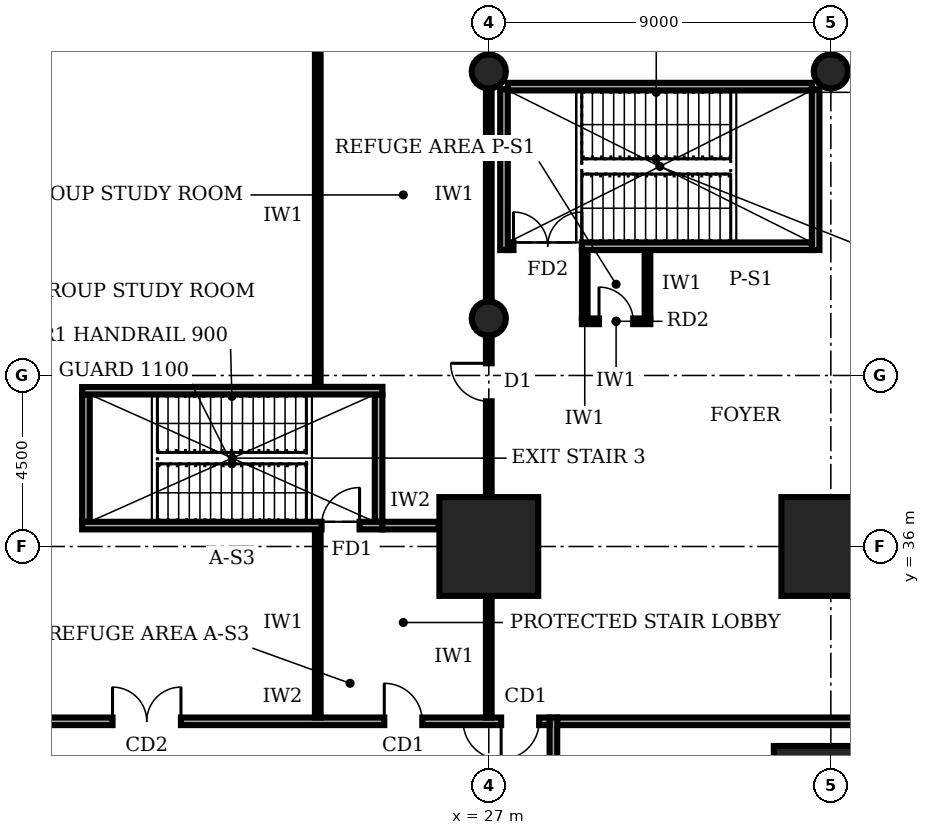
"""IFC4 building model, lengths in metres.
Left out: names, types, materials, properties, quantities, classifications, styles, units other than length and angle.
Written with IfcOpenShell. Run it as: python <this file> out.ifc"""

import sys

from ifc_helpers import new_model, si_unit, direction, frame, frame_2d, origin, origin_2d, place, context, subcontext, project, spatial, rectangle, circle, extrude, element, fill, save


model = new_model("IFC4")
c1 = context("Model", 3, precision=1e-05, world=origin(), true_north=direction((0.0, 1.0)))
c2 = subcontext(c1, "Body", "Model", "MODEL_VIEW")
j1 = project(units=[si_unit("LENGTHUNIT", "METRE"), si_unit("PLANEANGLEUNIT", "RADIAN")], contexts=[c1])
p1 = place(None, origin())
s1 = spatial("IfcSite", under=j1, at=p1, CompositionType="ELEMENT")
p2 = place(p1, origin())
s2 = spatial("IfcBuilding", under=s1, at=p2, CompositionType="ELEMENT")
p3 = place(p2, frame((0.0, 0.0, 11.0)))
s3 = spatial("IfcBuildingStorey", under=s2, at=p3, CompositionType="ELEMENT", Elevation=11.0)
p4 = place(p3, frame((36.0, 29.25, 0.0), z_axis=(0.0, 0.0, 1.0), x_axis=(1.0, 0.0, 0.0)))
e1 = element("IfcColumn", 1, at=p4, inside=s3, PredefinedType="COLUMN", context=c2, shape_type="SweptSolid", body=[
    extrude(rectangle(XDim=3.0, YDim=3.0, at=origin_2d()), origin(), (0.0, 0.0, 1.0), 5.0),
])
for number, where, z_axis, x_axis in (
    (2, (27.0, 36.0, 0.0), (0.0, 0.0, 1.0), (1.0, 0.0, 0.0)),
    (3, (36.0, 36.0, 0.0), (0.0, 0.0, 1.0), (1.0, 0.0, 0.0)),
):
    element("IfcColumn", number, at=place(p3, frame(where, z_axis=z_axis, x_axis=x_axis)), inside=s3, PredefinedType="COLUMN", context=c2, shape_type="SweptSolid", body=[
        extrude(rectangle(XDim=2.6, YDim=2.6, at=origin_2d()), origin(), (0.0, 0.0, 1.0), 5.0),
    ])
for number, where, z_axis, x_axis in (
    (4, (27.0, 42.0, 0.0), (0.0, 0.0, 1.0), (1.0, 0.0, 0.0)),
    (5, (27.0, 48.5, 0.0), (0.0, 0.0, 1.0), (1.0, 0.0, 0.0)),
    (6, (36.0, 48.5, 0.0), (0.0, 0.0, 1.0), (1.0, 0.0, 0.0)),
):
    element("IfcColumn", number, at=place(p3, frame(where, z_axis=z_axis, x_axis=x_axis)), inside=s3, PredefinedType="COLUMN", context=c2, shape_type="SweptSolid", body=[
        extrude(circle(Radius=0.45, at=origin_2d()), origin(), (0.0, 0.0, 1.0), 5.0),
    ])
p5 = place(p3, frame((28.7, 9.2, 0.0), z_axis=(0.0, 0.0, 1.0), x_axis=(0.0, 1.0, 0.0)))
e7 = element("IfcWall", 7, at=p5, inside=s3, PredefinedType="SOLIDWALL", context=c2, shape_type="SweptSolid", body=[
    extrude(rectangle(XDim=22.3, YDim=0.2, at=frame_2d((11.15, 0.0))), origin(), (0.0, 0.0, 1.0), 4.7),
])
p6 = place(p5, frame((1.55, 0.0, 0.0)))
e8 = element("IfcOpeningElement", 8, at=p6, cuts=e7, PredefinedType="OPENING", context=c2, shape_type="SweptSolid", body=[
    extrude(rectangle(XDim=1.0, YDim=2.1, at=frame_2d((0.5, 1.05))), frame((0.0, 0.11, 0.0), z_axis=(0.0, -1.0, 0.0), x_axis=(1.0, 0.0, 0.0)), (0.0, 0.0, 1.0), 0.22),
])
p7 = place(p5, frame((6.05, 0.0, 0.0)))
e9 = element("IfcOpeningElement", 9, at=p7, cuts=e7, PredefinedType="OPENING", context=c2, shape_type="SweptSolid", body=[
    extrude(rectangle(XDim=1.0, YDim=2.1, at=frame_2d((0.5, 1.05))), frame((0.0, 0.11, 0.0), z_axis=(0.0, -1.0, 0.0), x_axis=(1.0, 0.0, 0.0)), (0.0, 0.0, 1.0), 0.22),
])
p8 = place(p5, frame((12.4, 0.0, 0.0)))
e10 = element("IfcOpeningElement", 10, at=p8, cuts=e7, PredefinedType="OPENING", context=c2, shape_type="SweptSolid", body=[
    extrude(rectangle(XDim=1.8, YDim=2.1, at=frame_2d((0.9, 1.05))), frame((0.0, 0.11, 0.0), z_axis=(0.0, -1.0, 0.0), x_axis=(1.0, 0.0, 0.0)), (0.0, 0.0, 1.0), 0.22),
])
p9 = place(p5, frame((19.55, 0.0, 0.0)))
e11 = element("IfcOpeningElement", 11, at=p9, cuts=e7, PredefinedType="OPENING", context=c2, shape_type="SweptSolid", body=[
    extrude(rectangle(XDim=1.0, YDim=2.1, at=frame_2d((0.5, 1.05))), frame((0.0, 0.11, 0.0), z_axis=(0.0, -1.0, 0.0), x_axis=(1.0, 0.0, 0.0)), (0.0, 0.0, 1.0), 0.22),
])
p10 = place(p3, frame((28.6, 31.4, 0.0), z_axis=(0.0, 0.0, 1.0), x_axis=(-1.0, 0.0, 0.0)))
e12 = element("IfcWall", 12, at=p10, inside=s3, PredefinedType="SOLIDWALL", context=c2, shape_type="SweptSolid", body=[
    extrude(rectangle(XDim=16.9, YDim=0.2, at=frame_2d((8.45, 0.0))), origin(), (0.0, 0.0, 1.0), 4.7),
])
p11 = place(p10, frame((15.425, 0.0, 0.0)))
e13 = element("IfcOpeningElement", 13, at=p11, cuts=e12, PredefinedType="OPENING", context=c2, shape_type="SweptSolid", body=[
    extrude(rectangle(XDim=1.0, YDim=2.1, at=frame_2d((0.5, 1.05))), frame((0.0, 0.11, 0.0), z_axis=(0.0, -1.0, 0.0), x_axis=(1.0, 0.0, 0.0)), (0.0, 0.0, 1.0), 0.22),
])
p12 = place(p10, frame((9.7, 0.0, 0.0)))
e14 = element("IfcOpeningElement", 14, at=p12, cuts=e12, PredefinedType="OPENING", context=c2, shape_type="SweptSolid", body=[
    extrude(rectangle(XDim=1.8, YDim=2.1, at=frame_2d((0.9, 1.05))), frame((0.0, 0.11, 0.0), z_axis=(0.0, -1.0, 0.0), x_axis=(1.0, 0.0, 0.0)), (0.0, 0.0, 1.0), 0.22),
])
p13 = place(p10, frame((3.35, 0.0, 0.0)))
e15 = element("IfcOpeningElement", 15, at=p13, cuts=e12, PredefinedType="OPENING", context=c2, shape_type="SweptSolid", body=[
    extrude(rectangle(XDim=1.0, YDim=2.1, at=frame_2d((0.5, 1.05))), frame((0.0, 0.11, 0.0), z_axis=(0.0, -1.0, 0.0), x_axis=(1.0, 0.0, 0.0)), (0.0, 0.0, 1.0), 0.22),
])
p14 = place(p10, frame((0.275, 0.0, 0.0)))
e16 = element("IfcOpeningElement", 16, at=p14, cuts=e12, PredefinedType="OPENING", context=c2, shape_type="SweptSolid", body=[
    extrude(rectangle(XDim=1.0, YDim=2.1, at=frame_2d((0.5, 1.05))), frame((0.0, 0.11, 0.0), z_axis=(0.0, -1.0, 0.0), x_axis=(1.0, 0.0, 0.0)), (0.0, 0.0, 1.0), 0.22),
])
p15 = place(p3, frame((28.8, 31.4, 0.0), z_axis=(0.0, 0.0, 1.0), x_axis=(1.0, 0.0, 0.0)))
e17 = element("IfcWall", 17, at=p15, inside=s3, PredefinedType="SOLIDWALL", context=c2, shape_type="SweptSolid", body=[
    extrude(rectangle(XDim=11.52, YDim=0.2, at=frame_2d((5.76, 0.0))), origin(), (0.0, 0.0, 1.0), 4.7),
])
p16 = place(p3, frame((22.5, 31.5, 0.0), z_axis=(0.0, 0.0, 1.0), x_axis=(0.0, 1.0, 0.0)))
e18 = element("IfcWall", 18, at=p16, inside=s3, PredefinedType="PARTITIONING", context=c2, shape_type="SweptSolid", body=[
    extrude(rectangle(XDim=4.95, YDim=0.15, at=frame_2d((2.475, 0.0))), origin(), (0.0, 0.0, 1.0), 4.7),
])
p17 = place(p3, frame((22.5, 40.2, 0.0), z_axis=(0.0, 0.0, 1.0), x_axis=(0.0, 1.0, 0.0)))
e19 = element("IfcWall", 19, at=p17, inside=s3, PredefinedType="PARTITIONING", context=c2, shape_type="SweptSolid", body=[
    extrude(rectangle(XDim=9.0, YDim=0.15, at=frame_2d((4.5, 0.0))), origin(), (0.0, 0.0, 1.0), 4.7),
])
p18 = place(p3, frame((27.0, 31.5, 0.0), z_axis=(0.0, 0.0, 1.0), x_axis=(0.0, 1.0, 0.0)))
e20 = element("IfcWall", 20, at=p18, inside=s3, PredefinedType="PARTITIONING", context=c2, shape_type="SweptSolid", body=[
    extrude(rectangle(XDim=3.18, YDim=0.15, at=frame_2d((1.59, 0.0))), origin(), (0.0, 0.0, 1.0), 3.8),
])
p19 = place(p3, frame((27.0, 37.32, 0.0), z_axis=(0.0, 0.0, 1.0), x_axis=(0.0, 1.0, 0.0)))
e21 = element("IfcWall", 21, at=p19, inside=s3, PredefinedType="PARTITIONING", context=c2, shape_type="SweptSolid", body=[
    extrude(rectangle(XDim=4.21, YDim=0.15, at=frame_2d((2.105, 0.0))), origin(), (0.0, 0.0, 1.0), 3.7),
])
p20 = place(p19, frame((2.5, 0.0, 0.0)))
e22 = element("IfcOpeningElement", 22, at=p20, cuts=e21, PredefinedType="OPENING", context=c2, shape_type="SweptSolid", body=[
    extrude(rectangle(XDim=1.0, YDim=2.1, at=frame_2d((0.5, 1.05))), frame((0.0, 0.085, 0.0), z_axis=(0.0, -1.0, 0.0), x_axis=(1.0, 0.0, 0.0)), (0.0, 0.0, 1.0), 0.17),
])
p21 = place(p3, frame((27.0, 42.47, 0.0), z_axis=(0.0, 0.0, 1.0), x_axis=(0.0, 1.0, 0.0)))
e23 = element("IfcWall", 23, at=p21, inside=s3, PredefinedType="PARTITIONING", context=c2, shape_type="SweptSolid", body=[
    extrude(rectangle(XDim=5.56, YDim=0.15, at=frame_2d((2.78, 0.0))), origin(), (0.0, 0.0, 1.0), 3.7),
])
p22 = place(p3, frame((27.5, 43.9, 0.0), z_axis=(0.0, 0.0, 1.0), x_axis=(1.0, 0.0, 0.0)))
e24 = element("IfcWall", 24, at=p22, inside=s3, PredefinedType="SOLIDWALL", context=c2, shape_type="SweptSolid", body=[
    extrude(rectangle(XDim=8.0, YDim=0.2, at=frame_2d((4.0, 0.0))), origin(), (0.0, 0.0, 1.0), 4.7),
])
p23 = place(p22, frame((0.15, 0.0, 0.0)))
e25 = element("IfcOpeningElement", 25, at=p23, cuts=e24, PredefinedType="OPENING", context=c2, shape_type="SweptSolid", body=[
    extrude(rectangle(XDim=1.8, YDim=2.1, at=frame_2d((0.9, 1.05))), frame((0.0, 0.11, 0.0), z_axis=(0.0, -1.0, 0.0), x_axis=(1.0, 0.0, 0.0)), (0.0, 0.0, 1.0), 0.22),
])
p24 = place(p3, frame((27.5, 48.1, 0.0), z_axis=(0.0, 0.0, 1.0), x_axis=(1.0, 0.0, 0.0)))
e26 = element("IfcWall", 26, at=p24, inside=s3, PredefinedType="SOLIDWALL", context=c2, shape_type="SweptSolid", body=[
    extrude(rectangle(XDim=8.0, YDim=0.2, at=frame_2d((4.0, 0.0))), origin(), (0.0, 0.0, 1.0), 4.7),
])
for number, where, z_axis, x_axis in (
    (27, (27.4, 43.8, 0.0), (0.0, 0.0, 1.0), (0.0, 1.0, 0.0)),
    (28, (35.6, 43.8, 0.0), (0.0, 0.0, 1.0), (0.0, 1.0, 0.0)),
):
    element("IfcWall", number, at=place(p3, frame(where, z_axis=z_axis, x_axis=x_axis)), inside=s3, PredefinedType="SOLIDWALL", context=c2, shape_type="SweptSolid", body=[
        extrude(rectangle(XDim=4.23, YDim=0.2, at=frame_2d((2.115, 0.0))), origin(), (0.0, 0.0, 1.0), 4.7),
    ])
p25 = place(p3, frame((24.2, 36.55, 0.0), z_axis=(0.0, 0.0, 1.0), x_axis=(1.0, 0.0, 0.0)))
e29 = element("IfcWall", 29, at=p25, inside=s3, PredefinedType="SOLIDWALL", context=c2, shape_type="SweptSolid", body=[
    extrude(rectangle(XDim=1.48, YDim=0.2, at=frame_2d((0.74, 0.0))), origin(), (0.0, 0.0, 1.0), 4.7),
])
p26 = place(p3, frame((16.3, 36.55, 0.0), z_axis=(0.0, 0.0, 1.0), x_axis=(1.0, 0.0, 0.0)))
e30 = element("IfcWall", 30, at=p26, inside=s3, PredefinedType="SOLIDWALL", context=c2, shape_type="SweptSolid", body=[
    extrude(rectangle(XDim=7.9, YDim=0.2, at=frame_2d((3.95, 0.0))), origin(), (0.0, 0.0, 1.0), 4.7),
])
p27 = place(p26, frame((6.3, 0.0, 0.0)))
e31 = element("IfcOpeningElement", 31, at=p27, cuts=e30, PredefinedType="OPENING", context=c2, shape_type="SweptSolid", body=[
    extrude(rectangle(XDim=1.0, YDim=2.1, at=frame_2d((0.5, 1.05))), frame((0.0, 0.11, 0.0), z_axis=(0.0, -1.0, 0.0), x_axis=(1.0, 0.0, 0.0)), (0.0, 0.0, 1.0), 0.22),
])
p28 = place(p3, frame((16.3, 40.1, 0.0), z_axis=(0.0, 0.0, 1.0), x_axis=(1.0, 0.0, 0.0)))
e32 = element("IfcWall", 32, at=p28, inside=s3, PredefinedType="SOLIDWALL", context=c2, shape_type="SweptSolid", body=[
    extrude(rectangle(XDim=7.9, YDim=0.2, at=frame_2d((3.95, 0.0))), origin(), (0.0, 0.0, 1.0), 4.7),
])
for number, where, z_axis, x_axis in (
    (33, (16.4, 36.65, 0.0), (0.0, 0.0, 1.0), (0.0, 1.0, 0.0)),
    (34, (24.1, 36.65, 0.0), (0.0, 0.0, 1.0), (0.0, 1.0, 0.0)),
):
    element("IfcWall", number, at=place(p3, frame(where, z_axis=z_axis, x_axis=x_axis)), inside=s3, PredefinedType="SOLIDWALL", context=c2, shape_type="SweptSolid", body=[
        extrude(rectangle(XDim=3.35, YDim=0.2, at=frame_2d((1.675, 0.0))), origin(), (0.0, 0.0, 1.0), 4.7),
    ])
p29 = place(p3, frame((31.175, 42.0, 0.0), z_axis=(0.0, 0.0, 1.0), x_axis=(0.0, 1.0, 0.0)))
e35 = element("IfcWall", 35, at=p29, inside=s3, PredefinedType="PARTITIONING", context=c2, shape_type="SweptSolid", body=[
    extrude(rectangle(XDim=1.8, YDim=0.15, at=frame_2d((0.9, 0.0))), origin(), (0.0, 0.0, 1.0), 4.7),
])
p30 = place(p3, frame((29.45, 41.925, 0.0), z_axis=(0.0, 0.0, 1.0), x_axis=(1.0, 0.0, 0.0)))
e36 = element("IfcWall", 36, at=p30, inside=s3, PredefinedType="PARTITIONING", context=c2, shape_type="SweptSolid", body=[
    extrude(rectangle(XDim=1.8, YDim=0.15, at=frame_2d((0.9, 0.0))), origin(), (0.0, 0.0, 1.0), 4.7),
])
p31 = place(p30, frame((0.45, 0.0, 0.0)))
e37 = element("IfcOpeningElement", 37, at=p31, cuts=e36, PredefinedType="OPENING", context=c2, shape_type="SweptSolid", body=[
    extrude(rectangle(XDim=0.9, YDim=2.1, at=frame_2d((0.45, 1.05))), frame((0.0, 0.085, 0.0), z_axis=(0.0, -1.0, 0.0), x_axis=(1.0, 0.0, 0.0)), (0.0, 0.0, 1.0), 0.17),
])
p32 = place(p3, frame((29.525, 42.0, 0.0), z_axis=(0.0, 0.0, 1.0), x_axis=(0.0, 1.0, 0.0)))
e38 = element("IfcWall", 38, at=p32, inside=s3, PredefinedType="PARTITIONING", context=c2, shape_type="SweptSolid", body=[
    extrude(rectangle(XDim=1.8, YDim=0.15, at=frame_2d((0.9, 0.0))), origin(), (0.0, 0.0, 1.0), 4.7),
])
p33 = place(p12, frame((1.8, 0.0, 0.0), z_axis=(0.0, 0.0, 1.0), x_axis=(-1.0, 0.0, 0.0)))
e39 = element("IfcDoor", 39, at=p33, inside=s3, OperationType="DOUBLE_DOOR_SINGLE_SWING", PredefinedType="DOOR", context=c2, shape_type="SweptSolid", body=[
    extrude(rectangle(XDim=1.8, YDim=2.1, at=frame_2d((0.9, 1.05))), frame((0.0, 0.025, 0.0), z_axis=(0.0, -1.0, 0.0), x_axis=(1.0, 0.0, 0.0)), (0.0, 0.0, 1.0), 0.05),
])
fill(e14, e39)
p34 = place(p13, frame((1.0, 0.0, 0.0), z_axis=(0.0, 0.0, 1.0), x_axis=(-1.0, 0.0, 0.0)))
e40 = element("IfcDoor", 40, at=p34, inside=s3, OperationType="SINGLE_SWING_LEFT", PredefinedType="DOOR", context=c2, shape_type="SweptSolid", body=[
    extrude(rectangle(XDim=1.0, YDim=2.1, at=frame_2d((0.5, 1.05))), frame((0.0, 0.025, 0.0), z_axis=(0.0, -1.0, 0.0), x_axis=(1.0, 0.0, 0.0)), (0.0, 0.0, 1.0), 0.05),
])
fill(e15, e40)
p35 = place(p14, origin())
e41 = element("IfcDoor", 41, at=p35, inside=s3, OperationType="SINGLE_SWING_RIGHT", PredefinedType="DOOR", context=c2, shape_type="SweptSolid", body=[
    extrude(rectangle(XDim=1.0, YDim=2.1, at=frame_2d((0.5, 1.05))), frame((0.0, 0.025, 0.0), z_axis=(0.0, -1.0, 0.0), x_axis=(1.0, 0.0, 0.0)), (0.0, 0.0, 1.0), 0.05),
])
fill(e16, e41)
p36 = place(p20, origin())
e42 = element("IfcDoor", 42, at=p36, inside=s3, OperationType="SINGLE_SWING_RIGHT", PredefinedType="DOOR", context=c2, shape_type="SweptSolid", body=[
    extrude(rectangle(XDim=1.0, YDim=2.1, at=frame_2d((0.5, 1.05))), frame((0.0, 0.025, 0.0), z_axis=(0.0, -1.0, 0.0), x_axis=(1.0, 0.0, 0.0)), (0.0, 0.0, 1.0), 0.05),
])
fill(e22, e42)
p37 = place(p23, origin())
e43 = element("IfcDoor", 43, at=p37, inside=s3, OperationType="DOUBLE_DOOR_SINGLE_SWING", PredefinedType="DOOR", context=c2, shape_type="SweptSolid", body=[
    extrude(rectangle(XDim=1.8, YDim=2.1, at=frame_2d((0.9, 1.05))), frame((0.0, 0.025, 0.0), z_axis=(0.0, -1.0, 0.0), x_axis=(1.0, 0.0, 0.0)), (0.0, 0.0, 1.0), 0.05),
])
fill(e25, e43)
p38 = place(p27, origin())
e44 = element("IfcDoor", 44, at=p38, inside=s3, OperationType="SINGLE_SWING_RIGHT", PredefinedType="DOOR", context=c2, shape_type="SweptSolid", body=[
    extrude(rectangle(XDim=1.0, YDim=2.1, at=frame_2d((0.5, 1.05))), frame((0.0, 0.025, 0.0), z_axis=(0.0, -1.0, 0.0), x_axis=(1.0, 0.0, 0.0)), (0.0, 0.0, 1.0), 0.05),
])
fill(e31, e44)
p39 = place(p31, origin())
e45 = element("IfcDoor", 45, at=p39, inside=s3, OperationType="SINGLE_SWING_LEFT", PredefinedType="DOOR", context=c2, shape_type="SweptSolid", body=[
    extrude(rectangle(XDim=0.9, YDim=2.1, at=frame_2d((0.45, 1.05))), frame((0.0, 0.025, 0.0), z_axis=(0.0, -1.0, 0.0), x_axis=(1.0, 0.0, 0.0)), (0.0, 0.0, 1.0), 0.05),
])
fill(e37, e45)
save(model, sys.argv[1])
